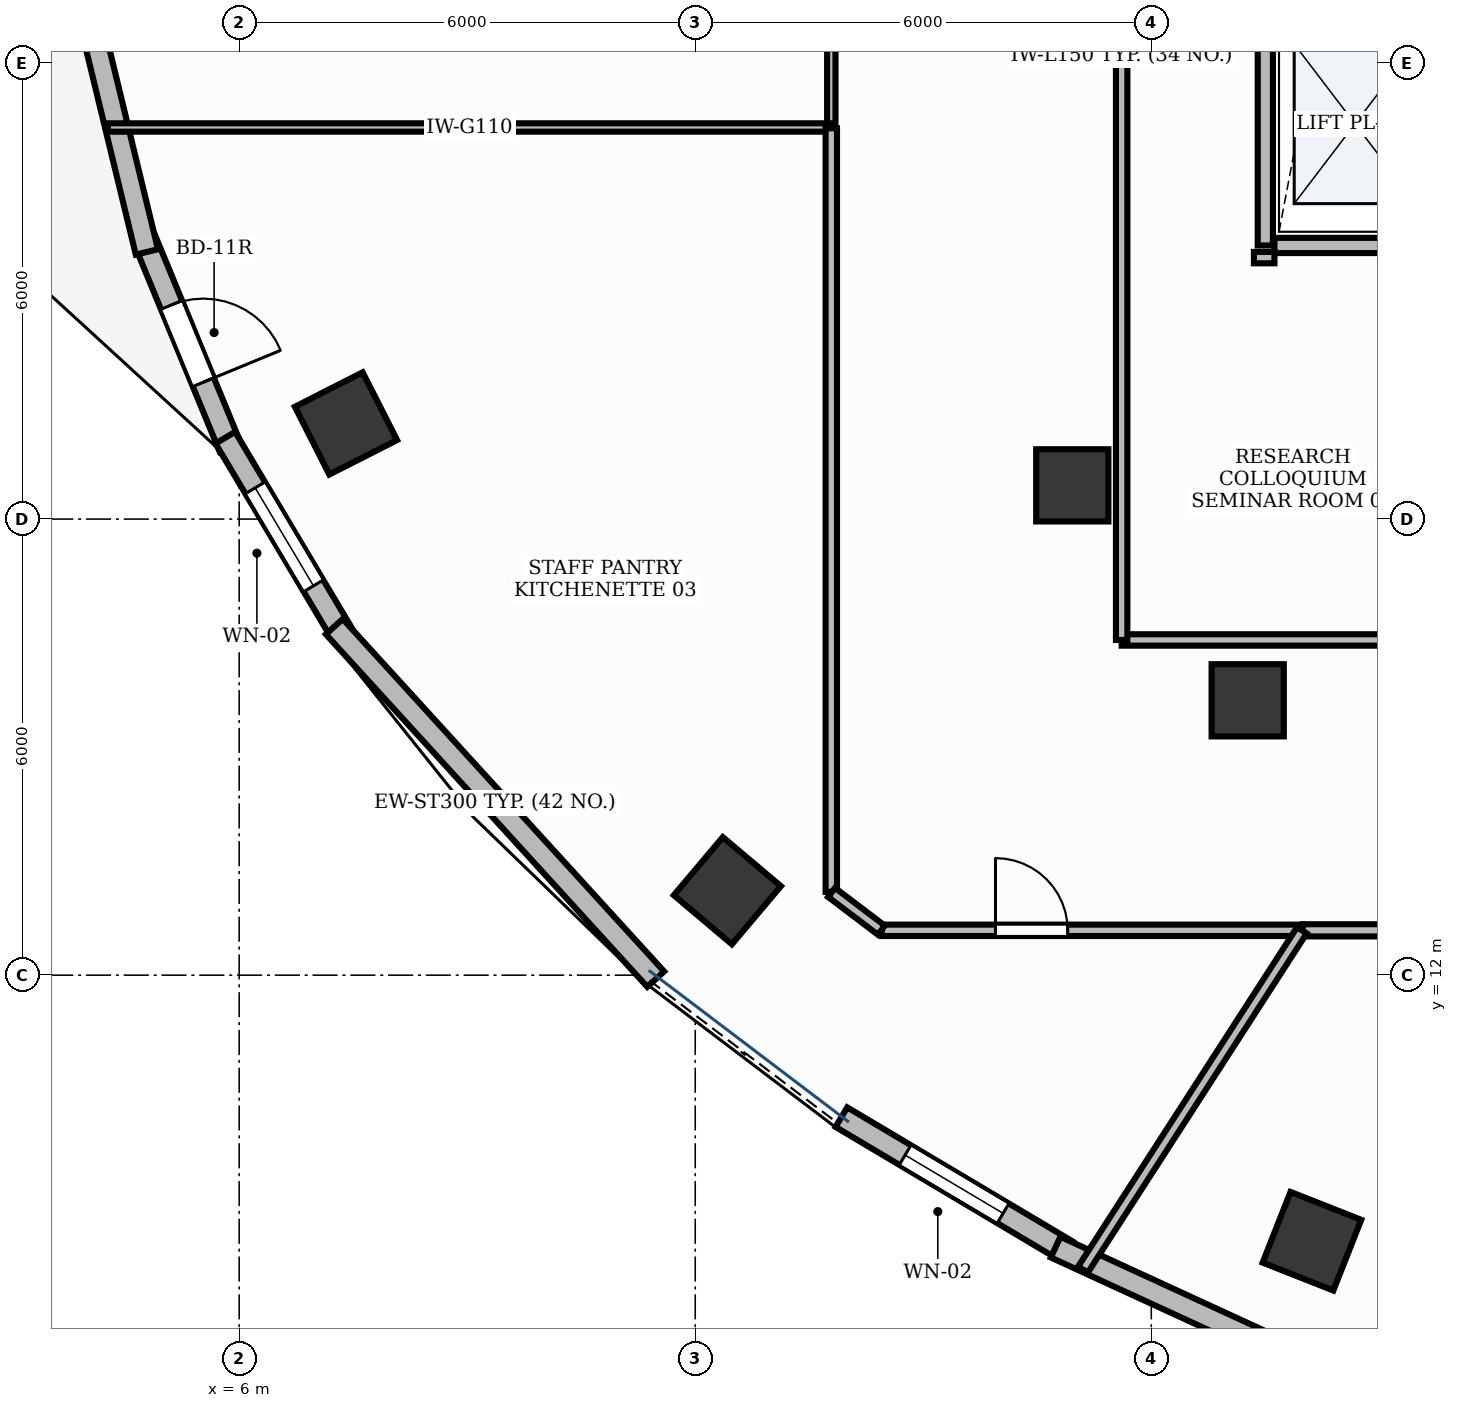
"""IFC4 building model, lengths in metres.
Left out: names, types, materials, properties, quantities, classifications, styles, units other than length and angle.
Written with IfcOpenShell. Run it as: python <this file> out.ifc"""

import sys

from ifc_helpers import new_model, si_unit, direction, frame, frame_2d, origin, origin_2d, place, context, subcontext, project, spatial, rectangle, extrude, element, fill, save


model = new_model("IFC4")
c1 = context("Model", 3, precision=1e-05, world=origin(), true_north=direction((0.0, 1.0)))
c2 = subcontext(c1, "Body", "Model", "MODEL_VIEW")
j1 = project(units=[si_unit("LENGTHUNIT", "METRE"), si_unit("PLANEANGLEUNIT", "RADIAN")], contexts=[c1])
p1 = place(None, origin())
s1 = spatial("IfcSite", under=j1, at=p1, CompositionType="ELEMENT")
p2 = place(p1, origin())
s2 = spatial("IfcBuilding", under=s1, at=p2, CompositionType="ELEMENT")
p3 = place(p2, frame((0.0, 0.0, 226.8)))
s3 = spatial("IfcBuildingStorey", under=s2, at=p3, CompositionType="ELEMENT", Elevation=226.8)
p4 = place(p3, frame((7.405, 19.259, -0.0), z_axis=(0.0, 0.0, 1.0), x_axis=(-0.453057191132, 0.891481453292, 0.0)))
e1 = element("IfcColumn", 1, at=p4, inside=s3, PredefinedType="COLUMN", context=c2, shape_type="SweptSolid", body=[
    extrude(rectangle(XDim=1.0, YDim=1.0, at=origin_2d()), origin(), (0.0, 0.0, 1.0), 3.901),
])
p5 = place(p3, frame((16.96, 18.444, -0.0), z_axis=(0.0, 0.0, 1.0), x_axis=(1.0, 0.0, 0.0)))
e2 = element("IfcColumn", 2, at=p5, inside=s3, PredefinedType="COLUMN", context=c2, shape_type="SweptSolid", body=[
    extrude(rectangle(XDim=0.95, YDim=0.95, at=origin_2d()), origin(), (0.0, 0.0, 1.0), 3.901),
])
p6 = place(p3, frame((12.423, 13.111, -0.0), z_axis=(0.0, 0.0, 1.0), x_axis=(-0.764246456939, 0.644924300253, 0.0)))
e3 = element("IfcColumn", 3, at=p6, inside=s3, PredefinedType="COLUMN", context=c2, shape_type="SweptSolid", body=[
    extrude(rectangle(XDim=1.0, YDim=1.0, at=origin_2d()), origin(), (0.0, 0.0, 1.0), 3.901),
])
p7 = place(p3, frame((19.268, 15.616, -0.0), z_axis=(0.0, 0.0, 1.0), x_axis=(1.0, 0.0, 0.0)))
e4 = element("IfcColumn", 4, at=p7, inside=s3, PredefinedType="COLUMN", context=c2, shape_type="SweptSolid", body=[
    extrude(rectangle(XDim=0.95, YDim=0.95, at=origin_2d()), origin(), (0.0, 0.0, 1.0), 3.901),
])
p8 = place(p3, frame((20.113, 8.5, -0.0), z_axis=(0.0, 0.0, 1.0), x_axis=(-0.930225540858, 0.366988341962, 0.0)))
e5 = element("IfcColumn", 5, at=p8, inside=s3, PredefinedType="COLUMN", context=c2, shape_type="SweptSolid", body=[
    extrude(rectangle(XDim=1.0, YDim=1.0, at=origin_2d()), origin(), (0.0, 0.0, 1.0), 3.901),
])
p9 = place(p3, frame((4.756, 21.676, 0.0), z_axis=(0.0, 0.0, 1.0), x_axis=(0.381011504275, -0.924570296738, 0.0)))
e6 = element("IfcWall", 6, at=p9, inside=s3, PredefinedType="STANDARD", context=c2, shape_type="SweptSolid", body=[
    extrude(rectangle(XDim=2.956, YDim=0.3, at=frame_2d((1.478, 0.0))), origin(), (0.0, 0.0, 1.0), 3.9),
])
p10 = place(p9, frame((0.928, 0.0, 0.0)))
e7 = element("IfcOpeningElement", 7, at=p10, cuts=e6, PredefinedType="OPENING", context=c2, shape_type="SweptSolid", body=[
    extrude(rectangle(XDim=1.1, YDim=2.15, at=frame_2d((0.55, 1.075))), frame((0.0, 0.165, 0.0), z_axis=(0.0, -1.0, 0.0), x_axis=(1.0, 0.0, 0.0)), (0.0, 0.0, 1.0), 0.33),
])
p11 = place(p3, frame((5.818, 19.071, 0.0), z_axis=(0.0, 0.0, 1.0), x_axis=(0.511263271049, -0.859424148879, 0.0)))
e8 = element("IfcWall", 8, at=p11, inside=s3, PredefinedType="STANDARD", context=c2, shape_type="SweptSolid", body=[
    extrude(rectangle(XDim=3.036, YDim=0.3, at=frame_2d((1.518, 0.0))), origin(), (0.0, 0.0, 1.0), 3.9),
])
p12 = place(p11, frame((0.768, 0.0, 0.95)))
e9 = element("IfcOpeningElement", 9, at=p12, cuts=e8, PredefinedType="OPENING", context=c2, shape_type="SweptSolid", body=[
    extrude(rectangle(XDim=1.5, YDim=1.8, at=frame_2d((0.75, 0.9))), frame((0.0, 0.165, 0.0), z_axis=(0.0, -1.0, 0.0), x_axis=(1.0, 0.0, 0.0)), (0.0, 0.0, 1.0), 0.33),
])
p13 = place(p3, frame((13.923, 10.132, 0.0), z_axis=(0.0, 0.0, 1.0), x_axis=(0.859459434124, -0.511203952543, 0.0)))
e10 = element("IfcWall", 10, at=p13, inside=s3, PredefinedType="STANDARD", context=c2, shape_type="SweptSolid", body=[
    extrude(rectangle(XDim=3.45, YDim=0.3, at=frame_2d((1.725, 0.0))), origin(), (0.0, 0.0, 1.0), 3.9),
])
p14 = place(p13, frame((0.975, 0.0, 0.95)))
e11 = element("IfcOpeningElement", 11, at=p14, cuts=e10, PredefinedType="OPENING", context=c2, shape_type="SweptSolid", body=[
    extrude(rectangle(XDim=1.5, YDim=1.8, at=frame_2d((0.75, 0.9))), frame((0.0, 0.165, 0.0), z_axis=(0.0, -1.0, 0.0), x_axis=(1.0, 0.0, 0.0)), (0.0, 0.0, 1.0), 0.33),
])
p15 = place(p3, frame((4.094, 24.371, 0.0), z_axis=(0.0, 0.0, 1.0), x_axis=(0.235531068122, -0.971866820068, 0.0)))
e12 = element("IfcWall", 12, at=p15, inside=s3, PredefinedType="STANDARD", context=c2, shape_type="SweptSolid", body=[
    extrude(rectangle(XDim=2.939, YDim=0.3, at=frame_2d((1.469, 0.0))), origin(), (0.0, 0.0, 1.0), 3.9),
])
p16 = place(p3, frame((7.252, 16.585, 0.0), z_axis=(0.0, 0.0, 1.0), x_axis=(0.673735114185, -0.73897293314, 0.0)))
e13 = element("IfcWall", 13, at=p16, inside=s3, PredefinedType="STANDARD", context=c2, shape_type="SweptSolid", body=[
    extrude(rectangle(XDim=6.276, YDim=0.3, at=frame_2d((3.138, 0.0))), origin(), (0.0, 0.0, 1.0), 3.9),
])
p17 = place(p3, frame((16.741, 8.422, 0.0), z_axis=(0.0, 0.0, 1.0), x_axis=(0.908506474671, -0.417870776055, 0.0)))
e14 = element("IfcWall", 14, at=p17, inside=s3, PredefinedType="STANDARD", context=c2, shape_type="SweptSolid", body=[
    extrude(rectangle(XDim=3.587, YDim=0.3, at=frame_2d((1.793, 0.0))), origin(), (0.0, 0.0, 1.0), 3.9),
])
p18 = place(p3, frame((19.5, 21.6, 0.0), z_axis=(0.0, 0.0, 1.0), x_axis=(0.0, 1.0, 0.0)))
e15 = element("IfcWall", 15, at=p18, inside=s3, PredefinedType="PARTITIONING", context=c2, shape_type="SweptSolid", body=[
    extrude(rectangle(XDim=10.8, YDim=0.2, at=frame_2d((5.4, 0.0))), origin(), (0.0, 0.0, 1.0), 2.91),
])
p19 = place(p3, frame((19.62, 21.6, 0.0), z_axis=(0.0, 0.0, 1.0), x_axis=(1.0, 0.0, 0.0)))
e16 = element("IfcWall", 16, at=p19, inside=s3, PredefinedType="PARTITIONING", context=c2, shape_type="SweptSolid", body=[
    extrude(rectangle(XDim=2.11, YDim=0.2, at=frame_2d((1.055, 0.0))), origin(), (0.0, 0.0, 1.0), 2.91),
])
p20 = place(p3, frame((13.79, 28.39, 0.0), z_axis=(0.0, 0.0, 1.0), x_axis=(0.0, -1.0, 0.0)))
e17 = element("IfcWall", 17, at=p20, inside=s3, PredefinedType="MOVABLE", context=c2, shape_type="SweptSolid", body=[
    extrude(rectangle(XDim=5.238, YDim=0.11, at=frame_2d((2.619, 0.0))), origin(), (0.0, 0.0, 1.0), 2.91),
])
p21 = place(p20, frame((2.35, 0.0, 0.0)))
e18 = element("IfcOpeningElement", 18, at=p21, cuts=e17, PredefinedType="OPENING", context=c2, shape_type="SweptSolid", body=[
    extrude(rectangle(XDim=0.95, YDim=2.15, at=frame_2d((0.475, 1.075))), frame((0.0, 0.07, 0.0), z_axis=(0.0, -1.0, 0.0), x_axis=(1.0, 0.0, 0.0)), (0.0, 0.0, 1.0), 0.14),
])
p22 = place(p3, frame((14.454, 12.59, 0.0), z_axis=(0.0, 0.0, 1.0), x_axis=(1.0, 0.0, 0.0)))
e19 = element("IfcWall", 19, at=p22, inside=s3, PredefinedType="PARTITIONING", context=c2, shape_type="SweptSolid", body=[
    extrude(rectangle(XDim=5.527, YDim=0.15, at=frame_2d((2.763, 0.0))), origin(), (0.0, 0.0, 1.0), 2.91),
])
p23 = place(p22, frame((1.496, 0.0, 0.0)))
e20 = element("IfcOpeningElement", 20, at=p23, cuts=e19, PredefinedType="OPENING", context=c2, shape_type="SweptSolid", body=[
    extrude(rectangle(XDim=0.95, YDim=2.15, at=frame_2d((0.475, 1.075))), frame((0.0, 0.09, 0.0), z_axis=(0.0, -1.0, 0.0), x_axis=(1.0, 0.0, 0.0)), (0.0, 0.0, 1.0), 0.18),
])
p24 = place(p3, frame((19.991, 12.59, 0.0), z_axis=(0.0, 0.0, 1.0), x_axis=(1.0, 0.0, 0.0)))
e21 = element("IfcWall", 21, at=p24, inside=s3, PredefinedType="PARTITIONING", context=c2, shape_type="SweptSolid", body=[
    extrude(rectangle(XDim=9.611, YDim=0.16, at=frame_2d((4.805, 0.0))), origin(), (0.0, 0.0, 1.0), 2.91),
])
p25 = place(p24, frame((1.591, 0.0, 0.0)))
e22 = element("IfcOpeningElement", 22, at=p25, cuts=e21, PredefinedType="OPENING", context=c2, shape_type="SweptSolid", body=[
    extrude(rectangle(XDim=0.95, YDim=2.15, at=frame_2d((0.475, 1.075))), frame((0.0, 0.095, 0.0), z_axis=(0.0, -1.0, 0.0), x_axis=(1.0, 0.0, 0.0)), (0.0, 0.0, 1.0), 0.19),
])
p26 = place(p3, frame((13.79, 23.152, 0.0), z_axis=(0.0, 0.0, 1.0), x_axis=(-1.0, 0.0, 0.0)))
e23 = element("IfcWall", 23, at=p26, inside=s3, PredefinedType="MOVABLE", context=c2, shape_type="SweptSolid", body=[
    extrude(rectangle(XDim=9.517, YDim=0.11, at=frame_2d((4.758, 0.0))), origin(), (0.0, 0.0, 1.0), 2.91),
])
p27 = place(p3, frame((19.35, 21.44, 0.0), z_axis=(0.0, 0.0, 1.0), x_axis=(1.0, 0.0, 0.0)))
e24 = element("IfcWall", 24, at=p27, inside=s3, PredefinedType="PARTITIONING", context=c2, shape_type="SweptSolid", body=[
    extrude(rectangle(XDim=0.27, YDim=0.15, at=frame_2d((0.135, 0.0))), origin(), (0.0, 0.0, 1.0), 2.91),
])
p28 = place(p3, frame((25.6, 16.41, 0.0), z_axis=(0.0, 0.0, 1.0), x_axis=(-1.0, 0.0, 0.0)))
e25 = element("IfcWall", 25, at=p28, inside=s3, PredefinedType="PARTITIONING", context=c2, shape_type="SweptSolid", body=[
    extrude(rectangle(XDim=7.99, YDim=0.15, at=frame_2d((3.995, 0.0))), origin(), (0.0, 0.0, 1.0), 2.91),
])
p29 = place(p3, frame((17.61, 16.41, 0.0), z_axis=(0.0, 0.0, 1.0), x_axis=(0.0, 1.0, 0.0)))
e26 = element("IfcWall", 26, at=p29, inside=s3, PredefinedType="PARTITIONING", context=c2, shape_type="SweptSolid", body=[
    extrude(rectangle(XDim=15.38, YDim=0.15, at=frame_2d((7.69, 0.0))), origin(), (0.0, 0.0, 1.0), 2.91),
])
p30 = place(p3, frame((13.79, 23.142, 0.0), z_axis=(0.0, 0.0, 1.0), x_axis=(0.0, -1.0, 0.0)))
e27 = element("IfcWall", 27, at=p30, inside=s3, PredefinedType="PARTITIONING", context=c2, shape_type="SweptSolid", body=[
    extrude(rectangle(XDim=10.046, YDim=0.15, at=frame_2d((5.023, 0.0))), origin(), (0.0, 0.0, 1.0), 2.91),
])
p31 = place(p3, frame((13.794, 13.088, 0.0), z_axis=(0.0, 0.0, 1.0), x_axis=(0.796957719098, -0.604035093326, 0.0)))
e28 = element("IfcWall", 28, at=p31, inside=s3, PredefinedType="PARTITIONING", context=c2, shape_type="SweptSolid", body=[
    extrude(rectangle(XDim=0.821, YDim=0.15, at=frame_2d((0.411, 0.0))), origin(), (0.0, 0.0, 1.0), 2.91),
])
p32 = place(p3, frame((19.981, 12.59, 0.0), z_axis=(0.0, 0.0, 1.0), x_axis=(-0.542120587928, -0.840300701026, 0.0)))
e29 = element("IfcWall", 29, at=p32, inside=s3, PredefinedType="PARTITIONING", context=c2, shape_type="SweptSolid", body=[
    extrude(rectangle(XDim=5.311, YDim=0.15, at=frame_2d((2.656, 0.0))), origin(), (0.0, 0.0, 1.0), 2.91),
])
p33 = place(p10, origin())
e30 = element("IfcDoor", 30, at=p33, inside=s3, OperationType="SINGLE_SWING_RIGHT", PredefinedType="DOOR", context=c2, shape_type="SweptSolid", body=[
    extrude(rectangle(XDim=1.1, YDim=2.15, at=frame_2d((0.55, 1.075))), frame((0.0, 0.025, 0.0), z_axis=(0.0, -1.0, 0.0), x_axis=(1.0, 0.0, 0.0)), (0.0, 0.0, 1.0), 0.05),
])
fill(e7, e30)
p34 = place(p12, origin())
e31 = element("IfcWindow", 31, at=p34, inside=s3, PartitioningType="DOUBLE_PANEL_VERTICAL", PredefinedType="WINDOW", context=c2, shape_type="SweptSolid", body=[
    extrude(rectangle(XDim=1.5, YDim=1.8, at=frame_2d((0.75, 0.9))), frame((0.0, 0.03, 0.0), z_axis=(0.0, -1.0, 0.0), x_axis=(1.0, 0.0, 0.0)), (0.0, 0.0, 1.0), 0.06),
])
fill(e9, e31)
p35 = place(p14, origin())
e32 = element("IfcWindow", 32, at=p35, inside=s3, PartitioningType="DOUBLE_PANEL_VERTICAL", PredefinedType="WINDOW", context=c2, shape_type="SweptSolid", body=[
    extrude(rectangle(XDim=1.5, YDim=1.8, at=frame_2d((0.75, 0.9))), frame((0.0, 0.03, 0.0), z_axis=(0.0, -1.0, 0.0), x_axis=(1.0, 0.0, 0.0)), (0.0, 0.0, 1.0), 0.06),
])
fill(e11, e32)
p36 = place(p23, origin())
e33 = element("IfcDoor", 33, at=p36, inside=s3, OperationType="SINGLE_SWING_LEFT", PredefinedType="DOOR", context=c2, shape_type="SweptSolid", body=[
    extrude(rectangle(XDim=0.95, YDim=2.15, at=frame_2d((0.475, 1.075))), frame((0.0, 0.025, 0.0), z_axis=(0.0, -1.0, 0.0), x_axis=(1.0, 0.0, 0.0)), (0.0, 0.0, 1.0), 0.05),
])
fill(e20, e33)
save(model, sys.argv[1])
